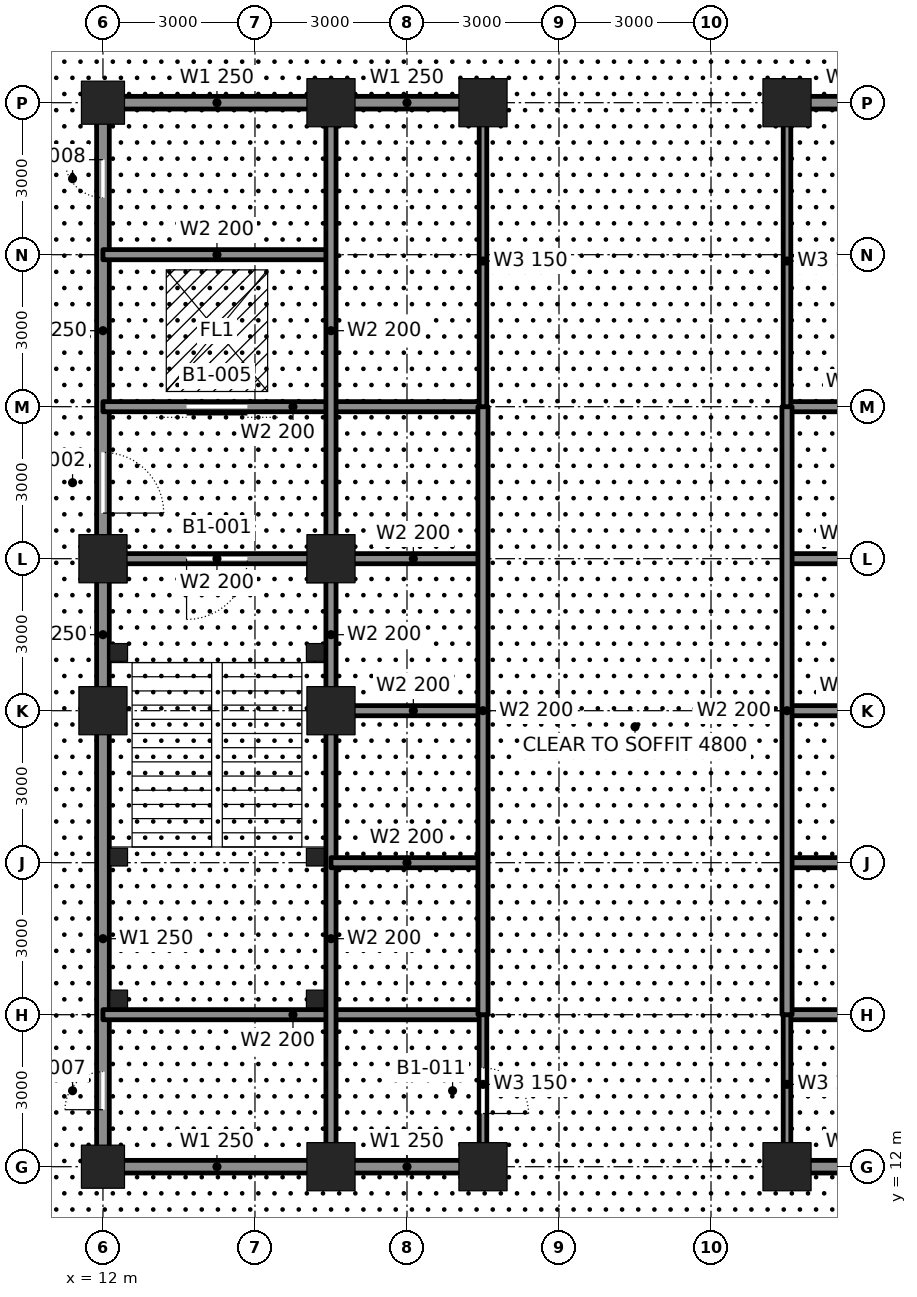
"""IFC4 building model, lengths in metres.
Left out: names, types, materials, properties, quantities, classifications, styles, units other than length and angle.
Written with IfcOpenShell. Run it as: python <this file> out.ifc"""

import sys

from ifc_helpers import new_model, si_unit, direction, frame, frame_2d, origin, origin_2d, place, context, subcontext, project, spatial, rectangle, hollow_rectangle, extrude, element, fill, save


model = new_model("IFC4")
c1 = context("Model", 3, precision=1e-05, world=origin(), true_north=direction((0.0, 1.0)))
c2 = subcontext(c1, "Body", "Model", "MODEL_VIEW")
j1 = project(units=[si_unit("LENGTHUNIT", "METRE"), si_unit("PLANEANGLEUNIT", "RADIAN")], contexts=[c1])
p1 = place(None, origin())
s1 = spatial("IfcSite", under=j1, at=p1, CompositionType="ELEMENT")
p2 = place(p1, origin())
s2 = spatial("IfcBuilding", under=s1, at=p2, CompositionType="ELEMENT")
p3 = place(p2, frame((0.0, 0.0, -5.0)))
s3 = spatial("IfcBuildingStorey", under=s2, at=p3, CompositionType="ELEMENT", Elevation=-5.0)
p4 = place(p3, frame((12.0, 12.0, -0.3), z_axis=(0.0, 0.0, 1.0), x_axis=(1.0, 0.0, 0.0)))
e1 = element("IfcColumn", 1, at=p4, inside=s3, PredefinedType="COLUMN", context=c2, shape_type="SweptSolid", body=[
    extrude(hollow_rectangle(XDim=0.85, YDim=0.85, WallThickness=0.085, at=origin_2d()), origin(), (0.0, 0.0, 1.0), 5.3),
])
for number, where, z_axis, x_axis in (
    (2, (16.5, 12.0, -0.3), (0.0, 0.0, 1.0), (1.0, 0.0, 0.0)),
    (3, (19.5, 12.0, -0.3), (0.0, 0.0, 1.0), (1.0, 0.0, 0.0)),
    (4, (25.5, 12.0, -0.3), (0.0, 0.0, 1.0), (1.0, 0.0, 0.0)),
):
    element("IfcColumn", number, at=place(p3, frame(where, z_axis=z_axis, x_axis=x_axis)), inside=s3, PredefinedType="COLUMN", context=c2, shape_type="SweptSolid", body=[
        extrude(hollow_rectangle(XDim=0.95, YDim=0.95, WallThickness=0.095, at=origin_2d()), origin(), (0.0, 0.0, 1.0), 5.3),
    ])
p5 = place(p3, frame((12.0, 33.0, -0.3), z_axis=(0.0, 0.0, 1.0), x_axis=(1.0, 0.0, 0.0)))
e5 = element("IfcColumn", 5, at=p5, inside=s3, PredefinedType="COLUMN", context=c2, shape_type="SweptSolid", body=[
    extrude(hollow_rectangle(XDim=0.85, YDim=0.85, WallThickness=0.085, at=origin_2d()), origin(), (0.0, 0.0, 1.0), 5.3),
])
for number, where, z_axis, x_axis in (
    (6, (16.5, 33.0, -0.3), (0.0, 0.0, 1.0), (1.0, 0.0, 0.0)),
    (7, (19.5, 33.0, -0.3), (0.0, 0.0, 1.0), (1.0, 0.0, 0.0)),
    (8, (25.5, 33.0, -0.3), (0.0, 0.0, 1.0), (1.0, 0.0, 0.0)),
    (9, (12.0, 21.0, -0.3), (0.0, 0.0, 1.0), (1.0, 0.0, 0.0)),
    (10, (12.0, 24.0, -0.3), (0.0, 0.0, 1.0), (1.0, 0.0, 0.0)),
    (11, (16.5, 21.0, -0.3), (0.0, 0.0, 1.0), (1.0, 0.0, 0.0)),
    (12, (16.5, 24.0, -0.3), (0.0, 0.0, 1.0), (1.0, 0.0, 0.0)),
):
    element("IfcColumn", number, at=place(p3, frame(where, z_axis=z_axis, x_axis=x_axis)), inside=s3, PredefinedType="COLUMN", context=c2, shape_type="SweptSolid", body=[
        extrude(hollow_rectangle(XDim=0.95, YDim=0.95, WallThickness=0.095, at=origin_2d()), origin(), (0.0, 0.0, 1.0), 5.3),
    ])
p6 = place(p3, frame((12.0, 12.25, 0.0), z_axis=(0.0, 0.0, 1.0), x_axis=(0.0, 1.0, 0.0)))
e13 = element("IfcWall", 13, at=p6, inside=s3, PredefinedType="SOLIDWALL", context=c2, shape_type="SweptSolid", body=[
    extrude(rectangle(XDim=8.5, YDim=0.25, at=frame_2d((4.25, 0.0))), origin(), (0.0, 0.0, 1.0), 3.873),
])
p7 = place(p6, frame((0.875, 0.0, 0.0)))
e14 = element("IfcOpeningElement", 14, at=p7, cuts=e13, PredefinedType="OPENING", context=c2, shape_type="SweptSolid", body=[
    extrude(rectangle(XDim=0.75, YDim=2.1, at=frame_2d((0.375, 1.05))), frame((0.0, 0.135, 0.0), z_axis=(0.0, -1.0, 0.0), x_axis=(1.0, 0.0, 0.0)), (0.0, 0.0, 1.0), 0.27),
])
p8 = place(p3, frame((12.0, 21.25, 0.0), z_axis=(0.0, 0.0, 1.0), x_axis=(0.0, 1.0, 0.0)))
e15 = element("IfcWall", 15, at=p8, inside=s3, PredefinedType="SOLIDWALL", context=c2, shape_type="SweptSolid", body=[
    extrude(rectangle(XDim=2.5, YDim=0.25, at=frame_2d((1.25, 0.0))), origin(), (0.0, 0.0, 1.0), 3.873),
])
p9 = place(p3, frame((12.0, 24.25, 0.0), z_axis=(0.0, 0.0, 1.0), x_axis=(0.0, 1.0, 0.0)))
e16 = element("IfcWall", 16, at=p9, inside=s3, PredefinedType="SOLIDWALL", context=c2, shape_type="SweptSolid", body=[
    extrude(rectangle(XDim=8.5, YDim=0.25, at=frame_2d((4.25, 0.0))), origin(), (0.0, 0.0, 1.0), 3.873),
])
p10 = place(p9, frame((0.65, 0.0, 0.0)))
e17 = element("IfcOpeningElement", 17, at=p10, cuts=e16, PredefinedType="OPENING", context=c2, shape_type="SweptSolid", body=[
    extrude(rectangle(XDim=1.2, YDim=2.1, at=frame_2d((0.6, 1.05))), frame((0.0, 0.135, 0.0), z_axis=(0.0, -1.0, 0.0), x_axis=(1.0, 0.0, 0.0)), (0.0, 0.0, 1.0), 0.27),
])
p11 = place(p9, frame((6.875, 0.0, 0.0)))
e18 = element("IfcOpeningElement", 18, at=p11, cuts=e16, PredefinedType="OPENING", context=c2, shape_type="SweptSolid", body=[
    extrude(rectangle(XDim=0.75, YDim=2.1, at=frame_2d((0.375, 1.05))), frame((0.0, 0.135, 0.0), z_axis=(0.0, -1.0, 0.0), x_axis=(1.0, 0.0, 0.0)), (0.0, 0.0, 1.0), 0.27),
])
p12 = place(p3, frame((12.25, 12.0, 0.0), z_axis=(0.0, 0.0, 1.0), x_axis=(1.0, 0.0, 0.0)))
e19 = element("IfcWall", 19, at=p12, inside=s3, PredefinedType="SOLIDWALL", context=c2, shape_type="SweptSolid", body=[
    extrude(rectangle(XDim=4.0, YDim=0.25, at=frame_2d((2.0, 0.0))), origin(), (0.0, 0.0, 1.0), 3.941),
])
for number, where, z_axis, x_axis in (
    (20, (16.75, 12.0, 0.0), (0.0, 0.0, 1.0), (1.0, 0.0, 0.0)),
    (21, (25.75, 12.0, 0.0), (0.0, 0.0, 1.0), (1.0, 0.0, 0.0)),
):
    element("IfcWall", number, at=place(p3, frame(where, z_axis=z_axis, x_axis=x_axis)), inside=s3, PredefinedType="SOLIDWALL", context=c2, shape_type="SweptSolid", body=[
        extrude(rectangle(XDim=2.5, YDim=0.25, at=frame_2d((1.25, 0.0))), origin(), (0.0, 0.0, 1.0), 3.941),
    ])
for number, where, z_axis, x_axis in (
    (22, (12.0, 15.0, 0.0), (0.0, 0.0, 1.0), (1.0, 0.0, 0.0)),
    (23, (25.5, 15.0, 0.0), (0.0, 0.0, 1.0), (1.0, 0.0, 0.0)),
):
    element("IfcWall", number, at=place(p3, frame(where, z_axis=z_axis, x_axis=x_axis)), inside=s3, PredefinedType="SOLIDWALL", context=c2, shape_type="SweptSolid", body=[
        extrude(rectangle(XDim=7.5, YDim=0.2, at=frame_2d((3.75, 0.0))), origin(), (0.0, 0.0, 1.0), 4.8),
    ])
p13 = place(p3, frame((12.25, 24.0, 0.0), z_axis=(0.0, 0.0, 1.0), x_axis=(1.0, 0.0, 0.0)))
e24 = element("IfcWall", 24, at=p13, inside=s3, PredefinedType="SOLIDWALL", context=c2, shape_type="SweptSolid", body=[
    extrude(rectangle(XDim=4.0, YDim=0.2, at=frame_2d((2.0, 0.0))), origin(), (0.0, 0.0, 1.0), 3.85),
])
p14 = place(p13, frame((1.4, 0.0, 0.0)))
e25 = element("IfcOpeningElement", 25, at=p14, cuts=e24, PredefinedType="OPENING", context=c2, shape_type="SweptSolid", body=[
    extrude(rectangle(XDim=1.2, YDim=2.1, at=frame_2d((0.6, 1.05))), frame((0.0, 0.11, 0.0), z_axis=(0.0, -1.0, 0.0), x_axis=(1.0, 0.0, 0.0)), (0.0, 0.0, 1.0), 0.22),
])
for number, where, z_axis, x_axis in (
    (26, (16.75, 24.0, 0.0), (0.0, 0.0, 1.0), (1.0, 0.0, 0.0)),
    (27, (25.5, 24.0, 0.0), (0.0, 0.0, 1.0), (1.0, 0.0, 0.0)),
):
    element("IfcWall", number, at=place(p3, frame(where, z_axis=z_axis, x_axis=x_axis)), inside=s3, PredefinedType="SOLIDWALL", context=c2, shape_type="SweptSolid", body=[
        extrude(rectangle(XDim=2.75, YDim=0.2, at=frame_2d((1.375, 0.0))), origin(), (0.0, 0.0, 1.0), 3.85),
    ])
p15 = place(p3, frame((12.0, 27.0, 0.0), z_axis=(0.0, 0.0, 1.0), x_axis=(1.0, 0.0, 0.0)))
e28 = element("IfcWall", 28, at=p15, inside=s3, PredefinedType="SOLIDWALL", context=c2, shape_type="SweptSolid", body=[
    extrude(rectangle(XDim=7.5, YDim=0.2, at=frame_2d((3.75, 0.0))), origin(), (0.0, 0.0, 1.0), 4.8),
])
p16 = place(p15, frame((1.65, 0.0, 0.0)))
e29 = element("IfcOpeningElement", 29, at=p16, cuts=e28, PredefinedType="OPENING", context=c2, shape_type="SweptSolid", body=[
    extrude(rectangle(XDim=1.2, YDim=2.1, at=frame_2d((0.6, 1.05))), frame((0.0, 0.11, 0.0), z_axis=(0.0, -1.0, 0.0), x_axis=(1.0, 0.0, 0.0)), (0.0, 0.0, 1.0), 0.22),
])
p17 = place(p3, frame((25.5, 27.0, 0.0), z_axis=(0.0, 0.0, 1.0), x_axis=(1.0, 0.0, 0.0)))
e30 = element("IfcWall", 30, at=p17, inside=s3, PredefinedType="SOLIDWALL", context=c2, shape_type="SweptSolid", body=[
    extrude(rectangle(XDim=3.0, YDim=0.2, at=frame_2d((1.5, 0.0))), origin(), (0.0, 0.0, 1.0), 4.8),
])
p18 = place(p3, frame((12.0, 30.0, 0.0), z_axis=(0.0, 0.0, 1.0), x_axis=(1.0, 0.0, 0.0)))
e31 = element("IfcWall", 31, at=p18, inside=s3, PredefinedType="SOLIDWALL", context=c2, shape_type="SweptSolid", body=[
    extrude(rectangle(XDim=4.5, YDim=0.2, at=frame_2d((2.25, 0.0))), origin(), (0.0, 0.0, 1.0), 4.8),
])
p19 = place(p3, frame((12.25, 33.0, 0.0), z_axis=(0.0, 0.0, 1.0), x_axis=(1.0, 0.0, 0.0)))
e32 = element("IfcWall", 32, at=p19, inside=s3, PredefinedType="SOLIDWALL", context=c2, shape_type="SweptSolid", body=[
    extrude(rectangle(XDim=4.0, YDim=0.25, at=frame_2d((2.0, 0.0))), origin(), (0.0, 0.0, 1.0), 3.941),
])
for number, where, z_axis, x_axis in (
    (33, (16.75, 33.0, 0.0), (0.0, 0.0, 1.0), (1.0, 0.0, 0.0)),
    (34, (25.75, 33.0, 0.0), (0.0, 0.0, 1.0), (1.0, 0.0, 0.0)),
):
    element("IfcWall", number, at=place(p3, frame(where, z_axis=z_axis, x_axis=x_axis)), inside=s3, PredefinedType="SOLIDWALL", context=c2, shape_type="SweptSolid", body=[
        extrude(rectangle(XDim=2.5, YDim=0.25, at=frame_2d((1.25, 0.0))), origin(), (0.0, 0.0, 1.0), 3.941),
    ])
p20 = place(p3, frame((16.5, 12.25, 0.0), z_axis=(0.0, 0.0, 1.0), x_axis=(0.0, 1.0, 0.0)))
e35 = element("IfcWall", 35, at=p20, inside=s3, PredefinedType="SOLIDWALL", context=c2, shape_type="SweptSolid", body=[
    extrude(rectangle(XDim=8.5, YDim=0.2, at=frame_2d((4.25, 0.0))), origin(), (0.0, 0.0, 1.0), 3.873),
])
p21 = place(p3, frame((16.5, 21.25, 0.0), z_axis=(0.0, 0.0, 1.0), x_axis=(0.0, 1.0, 0.0)))
e36 = element("IfcWall", 36, at=p21, inside=s3, PredefinedType="SOLIDWALL", context=c2, shape_type="SweptSolid", body=[
    extrude(rectangle(XDim=2.5, YDim=0.2, at=frame_2d((1.25, 0.0))), origin(), (0.0, 0.0, 1.0), 3.873),
])
p22 = place(p3, frame((16.5, 24.25, 0.0), z_axis=(0.0, 0.0, 1.0), x_axis=(0.0, 1.0, 0.0)))
e37 = element("IfcWall", 37, at=p22, inside=s3, PredefinedType="SOLIDWALL", context=c2, shape_type="SweptSolid", body=[
    extrude(rectangle(XDim=8.5, YDim=0.2, at=frame_2d((4.25, 0.0))), origin(), (0.0, 0.0, 1.0), 3.873),
])
p23 = place(p3, frame((16.5, 18.0, 0.0), z_axis=(0.0, 0.0, 1.0), x_axis=(1.0, 0.0, 0.0)))
e38 = element("IfcWall", 38, at=p23, inside=s3, PredefinedType="SOLIDWALL", context=c2, shape_type="SweptSolid", body=[
    extrude(rectangle(XDim=3.0, YDim=0.2, at=frame_2d((1.5, 0.0))), origin(), (0.0, 0.0, 1.0), 4.8),
])
p24 = place(p3, frame((25.5, 18.0, 0.0), z_axis=(0.0, 0.0, 1.0), x_axis=(1.0, 0.0, 0.0)))
e39 = element("IfcWall", 39, at=p24, inside=s3, PredefinedType="SOLIDWALL", context=c2, shape_type="SweptSolid", body=[
    extrude(rectangle(XDim=7.5, YDim=0.2, at=frame_2d((3.75, 0.0))), origin(), (0.0, 0.0, 1.0), 4.8),
])
p25 = place(p24, frame((4.65, 0.0, 0.0)))
e40 = element("IfcOpeningElement", 40, at=p25, cuts=e39, PredefinedType="OPENING", context=c2, shape_type="SweptSolid", body=[
    extrude(rectangle(XDim=1.2, YDim=2.1, at=frame_2d((0.6, 1.05))), frame((0.0, 0.11, 0.0), z_axis=(0.0, -1.0, 0.0), x_axis=(1.0, 0.0, 0.0)), (0.0, 0.0, 1.0), 0.22),
])
for number, where, z_axis, x_axis in (
    (41, (16.75, 21.0, 0.0), (0.0, 0.0, 1.0), (1.0, 0.0, 0.0)),
    (42, (25.5, 21.0, 0.0), (0.0, 0.0, 1.0), (1.0, 0.0, 0.0)),
):
    element("IfcWall", number, at=place(p3, frame(where, z_axis=z_axis, x_axis=x_axis)), inside=s3, PredefinedType="SOLIDWALL", context=c2, shape_type="SweptSolid", body=[
        extrude(rectangle(XDim=2.75, YDim=0.2, at=frame_2d((1.375, 0.0))), origin(), (0.0, 0.0, 1.0), 3.85),
    ])
p26 = place(p3, frame((19.5, 12.25, 0.0), z_axis=(0.0, 0.0, 1.0), x_axis=(0.0, 1.0, 0.0)))
e43 = element("IfcWall", 43, at=p26, inside=s3, PredefinedType="PARTITIONING", context=c2, shape_type="SweptSolid", body=[
    extrude(rectangle(XDim=2.75, YDim=0.15, at=frame_2d((1.375, 0.0))), origin(), (0.0, 0.0, 1.0), 3.825),
])
p27 = place(p26, frame((0.8, 0.0, 0.0)))
e44 = element("IfcOpeningElement", 44, at=p27, cuts=e43, PredefinedType="OPENING", context=c2, shape_type="SweptSolid", body=[
    extrude(rectangle(XDim=0.9, YDim=2.1, at=frame_2d((0.45, 1.05))), frame((0.0, 0.085, 0.0), z_axis=(0.0, -1.0, 0.0), x_axis=(1.0, 0.0, 0.0)), (0.0, 0.0, 1.0), 0.17),
])
p28 = place(p3, frame((19.5, 15.0, 0.0), z_axis=(0.0, 0.0, 1.0), x_axis=(0.0, 1.0, 0.0)))
e45 = element("IfcWall", 45, at=p28, inside=s3, PredefinedType="SOLIDWALL", context=c2, shape_type="SweptSolid", body=[
    extrude(rectangle(XDim=12.0, YDim=0.2, at=frame_2d((6.0, 0.0))), origin(), (0.0, 0.0, 1.0), 3.825),
])
p29 = place(p3, frame((19.5, 27.0, 0.0), z_axis=(0.0, 0.0, 1.0), x_axis=(0.0, 1.0, 0.0)))
e46 = element("IfcWall", 46, at=p29, inside=s3, PredefinedType="PARTITIONING", context=c2, shape_type="SweptSolid", body=[
    extrude(rectangle(XDim=5.75, YDim=0.15, at=frame_2d((2.875, 0.0))), origin(), (0.0, 0.0, 1.0), 3.825),
])
p30 = place(p3, frame((25.5, 12.25, 0.0), z_axis=(0.0, 0.0, 1.0), x_axis=(0.0, 1.0, 0.0)))
e47 = element("IfcWall", 47, at=p30, inside=s3, PredefinedType="PARTITIONING", context=c2, shape_type="SweptSolid", body=[
    extrude(rectangle(XDim=2.75, YDim=0.15, at=frame_2d((1.375, 0.0))), origin(), (0.0, 0.0, 1.0), 3.825),
])
p31 = place(p3, frame((25.5, 15.0, 0.0), z_axis=(0.0, 0.0, 1.0), x_axis=(0.0, 1.0, 0.0)))
e48 = element("IfcWall", 48, at=p31, inside=s3, PredefinedType="SOLIDWALL", context=c2, shape_type="SweptSolid", body=[
    extrude(rectangle(XDim=12.0, YDim=0.2, at=frame_2d((6.0, 0.0))), origin(), (0.0, 0.0, 1.0), 3.825),
])
p32 = place(p3, frame((25.5, 27.0, 0.0), z_axis=(0.0, 0.0, 1.0), x_axis=(0.0, 1.0, 0.0)))
e49 = element("IfcWall", 49, at=p32, inside=s3, PredefinedType="PARTITIONING", context=c2, shape_type="SweptSolid", body=[
    extrude(rectangle(XDim=5.75, YDim=0.15, at=frame_2d((2.875, 0.0))), origin(), (0.0, 0.0, 1.0), 3.825),
])
for number, where, z_axis, x_axis in (
    (50, (12.31, 15.31, -0.3), (0.0, 0.0, 1.0), (1.0, 0.0, 0.0)),
    (51, (16.19, 15.31, -0.3), (0.0, 0.0, 1.0), (1.0, 0.0, 0.0)),
    (52, (12.31, 18.11, -0.3), (0.0, 0.0, 1.0), (1.0, 0.0, 0.0)),
    (53, (16.19, 18.11, -0.3), (0.0, 0.0, 1.0), (1.0, 0.0, 0.0)),
    (54, (12.31, 22.15, -0.3), (0.0, 0.0, 1.0), (1.0, 0.0, 0.0)),
    (55, (16.19, 22.15, -0.3), (0.0, 0.0, 1.0), (1.0, 0.0, 0.0)),
):
    element("IfcColumn", number, at=place(p3, frame(where, z_axis=z_axis, x_axis=x_axis)), inside=s3, PredefinedType="COLUMN", context=c2, shape_type="SweptSolid", body=[
        extrude(hollow_rectangle(XDim=0.35, YDim=0.35, WallThickness=0.035, at=origin_2d()), origin(), (0.0, 0.0, 1.0), 5.3),
    ])
p33 = place(p14, frame((1.2, 0.0, 0.0), z_axis=(0.0, 0.0, 1.0), x_axis=(-1.0, 0.0, 0.0)))
e56 = element("IfcDoor", 56, at=p33, inside=s3, OperationType="SINGLE_SWING_RIGHT", PredefinedType="DOOR", context=c2, shape_type="SweptSolid", body=[
    extrude(rectangle(XDim=1.2, YDim=2.1, at=frame_2d((0.6, 1.05))), frame((0.0, 0.025, 0.0), z_axis=(0.0, -1.0, 0.0), x_axis=(1.0, 0.0, 0.0)), (0.0, 0.0, 1.0), 0.05),
])
fill(e25, e56)
p34 = place(p10, frame((1.2, 0.0, 0.0), z_axis=(0.0, 0.0, 1.0), x_axis=(-1.0, 0.0, 0.0)))
e57 = element("IfcDoor", 57, at=p34, inside=s3, OperationType="SINGLE_SWING_RIGHT", PredefinedType="DOOR", context=c2, shape_type="SweptSolid", body=[
    extrude(rectangle(XDim=1.2, YDim=2.1, at=frame_2d((0.6, 1.05))), frame((0.0, 0.025, 0.0), z_axis=(0.0, -1.0, 0.0), x_axis=(1.0, 0.0, 0.0)), (0.0, 0.0, 1.0), 0.05),
])
fill(e17, e57)
p35 = place(p16, origin())
e58 = element("IfcDoor", 58, at=p35, inside=s3, OperationType="DOUBLE_DOOR_SLIDING", PredefinedType="DOOR", context=c2, shape_type="SweptSolid", body=[
    extrude(rectangle(XDim=1.2, YDim=2.1, at=frame_2d((0.6, 1.05))), frame((0.0, 0.025, 0.0), z_axis=(0.0, -1.0, 0.0), x_axis=(1.0, 0.0, 0.0)), (0.0, 0.0, 1.0), 0.05),
])
fill(e29, e58)
p36 = place(p7, origin())
e59 = element("IfcDoor", 59, at=p36, inside=s3, OperationType="SINGLE_SWING_LEFT", PredefinedType="DOOR", context=c2, shape_type="SweptSolid", body=[
    extrude(rectangle(XDim=0.75, YDim=2.1, at=frame_2d((0.375, 1.05))), frame((0.0, 0.025, 0.0), z_axis=(0.0, -1.0, 0.0), x_axis=(1.0, 0.0, 0.0)), (0.0, 0.0, 1.0), 0.05),
])
fill(e14, e59)
p37 = place(p11, origin())
e60 = element("IfcDoor", 60, at=p37, inside=s3, OperationType="SINGLE_SWING_RIGHT", PredefinedType="DOOR", context=c2, shape_type="SweptSolid", body=[
    extrude(rectangle(XDim=0.75, YDim=2.1, at=frame_2d((0.375, 1.05))), frame((0.0, 0.025, 0.0), z_axis=(0.0, -1.0, 0.0), x_axis=(1.0, 0.0, 0.0)), (0.0, 0.0, 1.0), 0.05),
])
fill(e18, e60)
p38 = place(p27, frame((0.9, 0.0, 0.0), z_axis=(0.0, 0.0, 1.0), x_axis=(-1.0, 0.0, 0.0)))
e61 = element("IfcDoor", 61, at=p38, inside=s3, OperationType="SINGLE_SWING_RIGHT", PredefinedType="DOOR", context=c2, shape_type="SweptSolid", body=[
    extrude(rectangle(XDim=0.9, YDim=2.1, at=frame_2d((0.45, 1.05))), frame((0.0, 0.025, 0.0), z_axis=(0.0, -1.0, 0.0), x_axis=(1.0, 0.0, 0.0)), (0.0, 0.0, 1.0), 0.05),
])
fill(e44, e61)
save(model, sys.argv[1])
